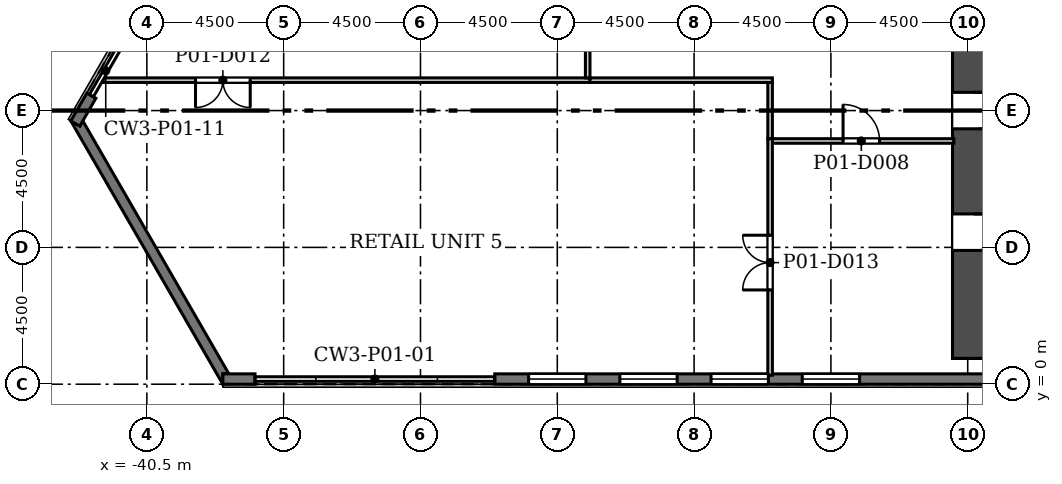
"""IFC4 building model, lengths in metres.
Left out: names, types, materials, properties, quantities, classifications, styles, units other than length and angle.
Written with IfcOpenShell. Run it as: python <this file> out.ifc"""

import sys

from ifc_helpers import new_model, si_unit, direction, frame, frame_2d, origin, place, context, subcontext, project, spatial, polyline, rectangle, outline, extrude, element, fill, save


model = new_model("IFC4")
c1 = context("Model", 3, precision=1e-05, world=origin(), true_north=direction((0.0, 1.0)))
c2 = subcontext(c1, "Body", "Model", "MODEL_VIEW")
j1 = project(units=[si_unit("LENGTHUNIT", "METRE"), si_unit("PLANEANGLEUNIT", "RADIAN")], contexts=[c1])
p1 = place(None, origin())
s1 = spatial("IfcSite", under=j1, at=p1, CompositionType="ELEMENT")
p2 = place(p1, origin())
s2 = spatial("IfcBuilding", under=s1, at=p2, CompositionType="ELEMENT")
p3 = place(p2, frame((0.0, 0.0, 8.0)))
s3 = spatial("IfcBuildingStorey", under=s2, at=p3, CompositionType="ELEMENT", Elevation=8.0)
p4 = place(p3, frame((-14.0, 1.55, 0.0), z_axis=(0.0, 0.0, 1.0), x_axis=(1.0, 0.0, 0.0)))
e1 = element("IfcWall", 1, at=p4, inside=s3, PredefinedType="SHEAR", context=c2, shape_type="SweptSolid", body=[
    extrude(rectangle(XDim=28.0, YDim=1.4, at=frame_2d((14.0, 0.0))), origin(), (0.0, 0.0, 1.0), 6.0),
])
p5 = place(p3, frame((-8.805, 18.65, 0.0), z_axis=(0.0, 0.0, 1.0), x_axis=(-0.50000187635, -0.866024320471, 0.0)))
e2 = element("IfcWall", 2, at=p5, inside=s3, PredefinedType="SHEAR", context=c2, shape_type="SweptSolid", body=[
    extrude(rectangle(XDim=9.177, YDim=1.4, at=frame_2d((4.588, 0.0))), origin(), (0.0, 0.0, 1.0), 6.0),
])
p6 = place(p3, frame((-13.3, 11.052, 0.0), z_axis=(0.0, 0.0, 1.0), x_axis=(0.0, -1.0, 0.0)))
e3 = element("IfcWall", 3, at=p6, inside=s3, PredefinedType="SHEAR", context=c2, shape_type="SweptSolid", body=[
    extrude(rectangle(XDim=10.202, YDim=1.4, at=frame_2d((5.101, 0.0))), origin(), (0.0, 0.0, 1.0), 6.0),
])
p7 = place(p6, frame((5.453, 0.0, 0.0)))
e4 = element("IfcOpeningElement", 4, at=p7, cuts=e3, PredefinedType="OPENING", context=c2, shape_type="SweptSolid", body=[
    extrude(rectangle(XDim=1.2, YDim=2.1, at=frame_2d((0.6, 1.05))), frame((0.0, 0.71, 0.0), z_axis=(0.0, -1.0, 0.0), x_axis=(1.0, 0.0, 0.0)), (0.0, 0.0, 1.0), 1.42),
])
p8 = place(p6, frame((1.453, 0.0, 0.0)))
e5 = element("IfcOpeningElement", 5, at=p8, cuts=e3, PredefinedType="OPENING", context=c2, shape_type="SweptSolid", body=[
    extrude(rectangle(XDim=1.2, YDim=2.1, at=frame_2d((0.6, 1.05))), frame((0.0, 0.71, 0.0), z_axis=(0.0, -1.0, 0.0), x_axis=(1.0, 0.0, 0.0)), (0.0, 0.0, 1.0), 1.42),
])
p9 = place(p3, origin())
e6 = element("IfcWall", 6, at=p9, inside=s3, PredefinedType="SOLIDWALL", context=c2, shape_type="SweptSolid", body=[
    extrude(outline(polyline([(-43.001, 8.661), (-42.706, 8.491), (-42.607, 8.661), (-37.803, 0.339), (-38.0, 0.339), (-38.0, -0.001), (-38.0, -0.001), (-43.001, 8.661), (-43.001, 8.661)])), origin(), (0.0, 0.0, 1.0), 5.7),
])
p10 = place(p3, frame((-38.0, 0.17, 0.0), z_axis=(0.0, 0.0, 1.0), x_axis=(1.0, 0.0, 0.0)))
e7 = element("IfcWall", 7, at=p10, inside=s3, PredefinedType="SOLIDWALL", context=c2, shape_type="SweptSolid", body=[
    extrude(rectangle(XDim=1.058, YDim=0.34, at=frame_2d((0.529, 0.0))), origin(), (0.0, 0.0, 1.0), 5.7),
])
p11 = place(p3, frame((-29.058, 0.17, 0.0), z_axis=(0.0, 0.0, 1.0), x_axis=(1.0, 0.0, 0.0)))
e8 = element("IfcWall", 8, at=p11, inside=s3, PredefinedType="SOLIDWALL", context=c2, shape_type="SweptSolid", body=[
    extrude(rectangle(XDim=46.115, YDim=0.34, at=frame_2d((23.058, 0.0))), origin(), (0.0, 0.0, 1.0), 5.7),
])
p12 = place(p11, frame((1.115, 0.0, 0.9)))
e9 = element("IfcOpeningElement", 9, at=p12, cuts=e8, PredefinedType="OPENING", context=c2, shape_type="SweptSolid", body=[
    extrude(rectangle(XDim=1.885, YDim=3.5, at=frame_2d((0.942, 1.75))), frame((0.0, 0.18, 0.0), z_axis=(0.0, -1.0, 0.0), x_axis=(1.0, 0.0, 0.0)), (0.0, 0.0, 1.0), 0.36),
])
p13 = place(p11, frame((4.115, 0.0, 0.9)))
e10 = element("IfcOpeningElement", 10, at=p13, cuts=e8, PredefinedType="OPENING", context=c2, shape_type="SweptSolid", body=[
    extrude(rectangle(XDim=1.885, YDim=3.5, at=frame_2d((0.942, 1.75))), frame((0.0, 0.18, 0.0), z_axis=(0.0, -1.0, 0.0), x_axis=(1.0, 0.0, 0.0)), (0.0, 0.0, 1.0), 0.36),
])
p14 = place(p11, frame((7.115, 0.0, 0.9)))
e11 = element("IfcOpeningElement", 11, at=p14, cuts=e8, PredefinedType="OPENING", context=c2, shape_type="SweptSolid", body=[
    extrude(rectangle(XDim=1.885, YDim=3.5, at=frame_2d((0.942, 1.75))), frame((0.0, 0.18, 0.0), z_axis=(0.0, -1.0, 0.0), x_axis=(1.0, 0.0, 0.0)), (0.0, 0.0, 1.0), 0.36),
])
p15 = place(p11, frame((10.115, 0.0, 0.9)))
e12 = element("IfcOpeningElement", 12, at=p15, cuts=e8, PredefinedType="OPENING", context=c2, shape_type="SweptSolid", body=[
    extrude(rectangle(XDim=1.885, YDim=3.5, at=frame_2d((0.942, 1.75))), frame((0.0, 0.18, 0.0), z_axis=(0.0, -1.0, 0.0), x_axis=(1.0, 0.0, 0.0)), (0.0, 0.0, 1.0), 0.36),
])
p16 = place(p3, frame((-42.324, 9.491, 0.0), z_axis=(0.0, 0.0, 1.0), x_axis=(-0.500062184469, -0.865989498588, 0.0)))
e13 = element("IfcWall", 13, at=p16, inside=s3, PredefinedType="SOLIDWALL", context=c2, shape_type="SweptSolid", body=[
    extrude(rectangle(XDim=1.057, YDim=0.34, at=frame_2d((0.529, 0.0))), origin(), (0.0, 0.0, 1.0), 5.7),
])
p17 = place(p3, frame((-19.925, 8.0, 0.0), z_axis=(0.0, 0.0, 1.0), x_axis=(1.0, 0.0, 0.0)))
e14 = element("IfcWall", 14, at=p17, inside=s3, PredefinedType="PARTITIONING", context=c2, shape_type="SweptSolid", body=[
    extrude(rectangle(XDim=5.97, YDim=0.15, at=frame_2d((2.985, 0.0))), origin(), (0.0, 0.0, 1.0), 5.7),
])
p18 = place(p17, frame((2.325, 0.0, 0.0)))
e15 = element("IfcOpeningElement", 15, at=p18, cuts=e14, PredefinedType="OPENING", context=c2, shape_type="SweptSolid", body=[
    extrude(rectangle(XDim=1.2, YDim=2.1, at=frame_2d((0.6, 1.05))), frame((0.0, 0.085, 0.0), z_axis=(0.0, -1.0, 0.0), x_axis=(1.0, 0.0, 0.0)), (0.0, 0.0, 1.0), 0.17),
])
p19 = place(p3, frame((-20.0, 8.075, 0.0), z_axis=(0.0, 0.0, 1.0), x_axis=(0.0, -1.0, 0.0)))
e16 = element("IfcWall", 16, at=p19, inside=s3, PredefinedType="PARTITIONING", context=c2, shape_type="SweptSolid", body=[
    extrude(rectangle(XDim=7.78, YDim=0.15, at=frame_2d((3.89, 0.0))), origin(), (0.0, 0.0, 1.0), 5.7),
])
p20 = place(p19, frame((3.175, 0.0, 0.0)))
e17 = element("IfcOpeningElement", 17, at=p20, cuts=e16, PredefinedType="OPENING", context=c2, shape_type="SweptSolid", body=[
    extrude(rectangle(XDim=1.8, YDim=2.1, at=frame_2d((0.9, 1.05))), frame((0.0, 0.085, 0.0), z_axis=(0.0, -1.0, 0.0), x_axis=(1.0, 0.0, 0.0)), (0.0, 0.0, 1.0), 0.17),
])
p21 = place(p3, frame((-20.0, 9.925, 0.0), z_axis=(0.0, 0.0, 1.0), x_axis=(0.0, -1.0, 0.0)))
e18 = element("IfcWall", 18, at=p21, inside=s3, PredefinedType="PARTITIONING", context=c2, shape_type="SweptSolid", body=[
    extrude(rectangle(XDim=1.85, YDim=0.15, at=frame_2d((0.925, 0.0))), origin(), (0.0, 0.0, 1.0), 5.7),
])
p22 = place(p3, frame((-41.944, 10.0, 0.0), z_axis=(0.0, 0.0, 1.0), x_axis=(1.0, 0.0, 0.0)))
e19 = element("IfcWall", 19, at=p22, inside=s3, PredefinedType="PARTITIONING", context=c2, shape_type="SweptSolid", body=[
    extrude(rectangle(XDim=16.019, YDim=0.15, at=frame_2d((8.009, 0.0))), origin(), (0.0, 0.0, 1.0), 5.7),
])
p23 = place(p22, frame((3.044, 0.0, 0.0)))
e20 = element("IfcOpeningElement", 20, at=p23, cuts=e19, PredefinedType="OPENING", context=c2, shape_type="SweptSolid", body=[
    extrude(rectangle(XDim=1.8, YDim=2.1, at=frame_2d((0.9, 1.05))), frame((0.0, 0.085, 0.0), z_axis=(0.0, -1.0, 0.0), x_axis=(1.0, 0.0, 0.0)), (0.0, 0.0, 1.0), 0.17),
])
p24 = place(p3, frame((-25.925, 10.0, 0.0), z_axis=(0.0, 0.0, 1.0), x_axis=(1.0, 0.0, 0.0)))
e21 = element("IfcWall", 21, at=p24, inside=s3, PredefinedType="PARTITIONING", context=c2, shape_type="SweptSolid", body=[
    extrude(rectangle(XDim=6.0, YDim=0.15, at=frame_2d((3.0, 0.0))), origin(), (0.0, 0.0, 1.0), 5.7),
])
p25 = place(p3, frame((-26.0, 10.075, 0.0), z_axis=(0.0, 0.0, 1.0), x_axis=(0.0, 1.0, 0.0)))
e22 = element("IfcWall", 22, at=p25, inside=s3, PredefinedType="PARTITIONING", context=c2, shape_type="SweptSolid", body=[
    extrude(rectangle(XDim=1.85, YDim=0.15, at=frame_2d((0.925, 0.0))), origin(), (0.0, 0.0, 1.0), 5.7),
])
p26 = place(p12, origin())
e23 = element("IfcWindow", 23, at=p26, inside=s3, PartitioningType="SINGLE_PANEL", PredefinedType="WINDOW", context=c2, shape_type="SweptSolid", body=[
    extrude(rectangle(XDim=1.885, YDim=3.5, at=frame_2d((0.942, 1.75))), frame((0.0, 0.11, 0.0), z_axis=(0.0, -1.0, 0.0), x_axis=(1.0, 0.0, 0.0)), (0.0, 0.0, 1.0), 0.06),
])
fill(e9, e23)
p27 = place(p13, origin())
e24 = element("IfcWindow", 24, at=p27, inside=s3, PartitioningType="SINGLE_PANEL", PredefinedType="WINDOW", context=c2, shape_type="SweptSolid", body=[
    extrude(rectangle(XDim=1.885, YDim=3.5, at=frame_2d((0.942, 1.75))), frame((0.0, 0.11, 0.0), z_axis=(0.0, -1.0, 0.0), x_axis=(1.0, 0.0, 0.0)), (0.0, 0.0, 1.0), 0.06),
])
fill(e10, e24)
p28 = place(p14, origin())
e25 = element("IfcWindow", 25, at=p28, inside=s3, PartitioningType="SINGLE_PANEL", PredefinedType="WINDOW", context=c2, shape_type="SweptSolid", body=[
    extrude(rectangle(XDim=1.885, YDim=3.5, at=frame_2d((0.942, 1.75))), frame((0.0, 0.11, 0.0), z_axis=(0.0, -1.0, 0.0), x_axis=(1.0, 0.0, 0.0)), (0.0, 0.0, 1.0), 0.06),
])
fill(e11, e25)
p29 = place(p15, origin())
e26 = element("IfcWindow", 26, at=p29, inside=s3, PartitioningType="SINGLE_PANEL", PredefinedType="WINDOW", context=c2, shape_type="SweptSolid", body=[
    extrude(rectangle(XDim=1.885, YDim=3.5, at=frame_2d((0.942, 1.75))), frame((0.0, 0.11, 0.0), z_axis=(0.0, -1.0, 0.0), x_axis=(1.0, 0.0, 0.0)), (0.0, 0.0, 1.0), 0.06),
])
fill(e12, e26)
p30 = place(p7, origin())
e27 = element("IfcDoor", 27, at=p30, inside=s3, OperationType="SINGLE_SWING_LEFT", PredefinedType="DOOR", context=c2, shape_type="SweptSolid", body=[
    extrude(rectangle(XDim=1.2, YDim=2.1, at=frame_2d((0.6, 1.05))), frame((0.0, 0.025, 0.0), z_axis=(0.0, -1.0, 0.0), x_axis=(1.0, 0.0, 0.0)), (0.0, 0.0, 1.0), 0.05),
])
fill(e4, e27)
p31 = place(p8, origin())
e28 = element("IfcDoor", 28, at=p31, inside=s3, OperationType="SINGLE_SWING_LEFT", PredefinedType="DOOR", context=c2, shape_type="SweptSolid", body=[
    extrude(rectangle(XDim=1.2, YDim=2.1, at=frame_2d((0.6, 1.05))), frame((0.0, 0.025, 0.0), z_axis=(0.0, -1.0, 0.0), x_axis=(1.0, 0.0, 0.0)), (0.0, 0.0, 1.0), 0.05),
])
fill(e5, e28)
p32 = place(p18, origin())
e29 = element("IfcDoor", 29, at=p32, inside=s3, OperationType="SINGLE_SWING_LEFT", PredefinedType="DOOR", context=c2, shape_type="SweptSolid", body=[
    extrude(rectangle(XDim=1.2, YDim=2.1, at=frame_2d((0.6, 1.05))), frame((0.0, 0.025, 0.0), z_axis=(0.0, -1.0, 0.0), x_axis=(1.0, 0.0, 0.0)), (0.0, 0.0, 1.0), 0.05),
])
fill(e15, e29)
p33 = place(p23, frame((1.8, 0.0, 0.0), z_axis=(0.0, 0.0, 1.0), x_axis=(-1.0, 0.0, 0.0)))
e30 = element("IfcDoor", 30, at=p33, inside=s3, OperationType="DOUBLE_DOOR_SINGLE_SWING", PredefinedType="DOOR", context=c2, shape_type="SweptSolid", body=[
    extrude(rectangle(XDim=1.8, YDim=2.1, at=frame_2d((0.9, 1.05))), frame((0.0, 0.025, 0.0), z_axis=(0.0, -1.0, 0.0), x_axis=(1.0, 0.0, 0.0)), (0.0, 0.0, 1.0), 0.05),
])
fill(e20, e30)
p34 = place(p20, frame((1.8, 0.0, 0.0), z_axis=(0.0, 0.0, 1.0), x_axis=(-1.0, 0.0, 0.0)))
e31 = element("IfcDoor", 31, at=p34, inside=s3, OperationType="DOUBLE_DOOR_SINGLE_SWING", PredefinedType="DOOR", context=c2, shape_type="SweptSolid", body=[
    extrude(rectangle(XDim=1.8, YDim=2.1, at=frame_2d((0.9, 1.05))), frame((0.0, 0.025, 0.0), z_axis=(0.0, -1.0, 0.0), x_axis=(1.0, 0.0, 0.0)), (0.0, 0.0, 1.0), 0.05),
])
fill(e17, e31)
save(model, sys.argv[1])
